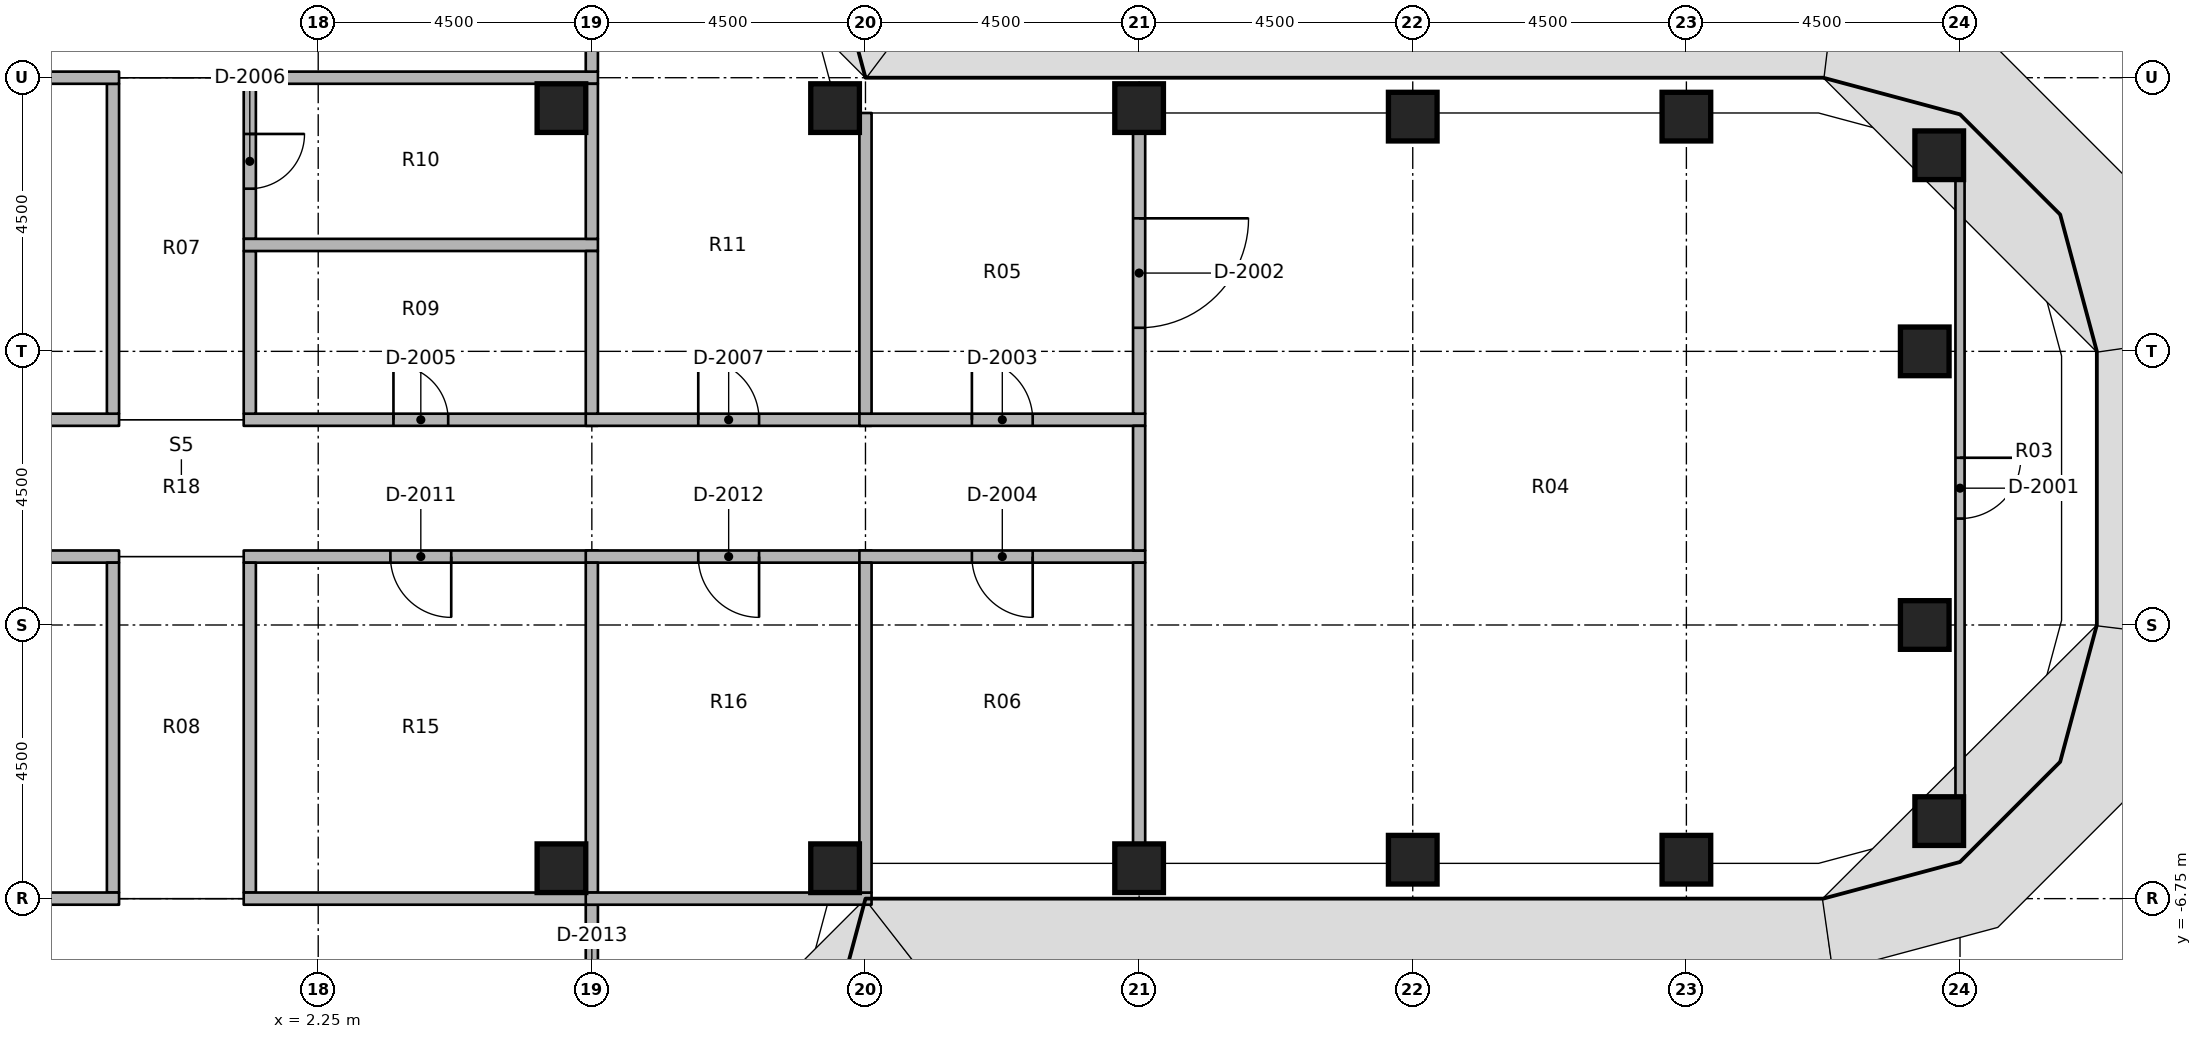
"""IFC4 building model, lengths in metres.
Left out: names, types, materials, properties, quantities, classifications, styles, units other than length and angle.
Written with IfcOpenShell. Run it as: python <this file> out.ifc"""

import sys

from ifc_helpers import new_model, si_unit, direction, frame, frame_2d, origin, origin_2d, place, context, subcontext, project, spatial, rectangle, extrude, element, fill, save


model = new_model("IFC4")
c1 = context("Model", 3, precision=1e-05, world=origin(), true_north=direction((0.0, 1.0)))
c2 = subcontext(c1, "Body", "Model", "MODEL_VIEW")
j1 = project(units=[si_unit("LENGTHUNIT", "METRE"), si_unit("PLANEANGLEUNIT", "RADIAN")], contexts=[c1])
p1 = place(None, origin())
s1 = spatial("IfcSite", under=j1, at=p1, CompositionType="ELEMENT")
p2 = place(p1, origin())
s2 = spatial("IfcBuilding", under=s1, at=p2, CompositionType="ELEMENT")
p3 = place(p2, frame((0.0, 0.0, 186.6)))
s3 = spatial("IfcBuildingStorey", under=s2, at=p3, CompositionType="ELEMENT", Elevation=186.6)
for number, where, z_axis, x_axis in (
    (1, (6.25, -6.25, 0.0), (0.0, 0.0, 1.0), (1.0, 0.0, 0.0)),
    (2, (6.25, 6.25, 0.0), (0.0, 0.0, 1.0), (1.0, 0.0, 0.0)),
    (3, (10.75, -6.25, 0.0), (0.0, 0.0, 1.0), (1.0, 0.0, 0.0)),
    (4, (10.75, 6.25, 0.0), (0.0, 0.0, 1.0), (1.0, 0.0, 0.0)),
    (5, (15.75, -6.25, 0.0), (0.0, 0.0, 1.0), (1.0, 0.0, 0.0)),
    (6, (15.75, 6.25, 0.0), (0.0, 0.0, 1.0), (1.0, 0.0, 0.0)),
    (7, (20.25, -6.11, 0.0), (0.0, 0.0, 1.0), (1.0, 0.0, 0.0)),
    (8, (20.25, 6.11, 0.0), (0.0, 0.0, 1.0), (1.0, 0.0, 0.0)),
    (9, (24.75, -6.11, 0.0), (0.0, 0.0, 1.0), (1.0, 0.0, 0.0)),
    (10, (24.75, 6.11, 0.0), (0.0, 0.0, 1.0), (1.0, 0.0, 0.0)),
    (11, (28.908, -5.475, 0.0), (0.0, 0.0, 1.0), (1.0, 0.0, 0.0)),
    (12, (28.67, -2.25, 0.0), (0.0, 0.0, 1.0), (1.0, 0.0, 0.0)),
    (13, (28.67, 2.25, 0.0), (0.0, 0.0, 1.0), (1.0, 0.0, 0.0)),
    (14, (28.908, 5.475, 0.0), (0.0, 0.0, 1.0), (1.0, 0.0, 0.0)),
):
    element("IfcColumn", number, at=place(p3, frame(where, z_axis=z_axis, x_axis=x_axis)), inside=s3, PredefinedType="COLUMN", context=c2, shape_type="SweptSolid", body=[
        extrude(rectangle(XDim=0.8, YDim=0.8, at=origin_2d()), origin(), (0.0, 0.0, 1.0), 3.65),
    ])
p4 = place(p3, frame((1.025, 1.125, 0.0), z_axis=(0.0, 0.0, 1.0), x_axis=(1.0, 0.0, 0.0)))
e15 = element("IfcWall", 15, at=p4, inside=s3, PredefinedType="PARTITIONING", context=c2, shape_type="SweptSolid", body=[
    extrude(rectangle(XDim=5.825, YDim=0.2, at=frame_2d((2.913, 0.0))), origin(), (0.0, 0.0, 1.0), 2.746),
])
p5 = place(p4, frame((2.462, 0.0, 0.0)))
e16 = element("IfcOpeningElement", 16, at=p5, cuts=e15, PredefinedType="OPENING", context=c2, shape_type="SweptSolid", body=[
    extrude(rectangle(XDim=0.9, YDim=2.1, at=frame_2d((0.45, 1.05))), frame((0.0, 0.11, 0.0), z_axis=(0.0, -1.0, 0.0), x_axis=(1.0, 0.0, 0.0)), (0.0, 0.0, 1.0), 0.22),
])
p6 = place(p3, frame((6.65, 1.125, 0.0), z_axis=(0.0, 0.0, 1.0), x_axis=(1.0, 0.0, 0.0)))
e17 = element("IfcWall", 17, at=p6, inside=s3, PredefinedType="PARTITIONING", context=c2, shape_type="SweptSolid", body=[
    extrude(rectangle(XDim=4.7, YDim=0.2, at=frame_2d((2.35, 0.0))), origin(), (0.0, 0.0, 1.0), 2.746),
])
p7 = place(p6, frame((1.85, 0.0, 0.0)))
e18 = element("IfcOpeningElement", 18, at=p7, cuts=e17, PredefinedType="OPENING", context=c2, shape_type="SweptSolid", body=[
    extrude(rectangle(XDim=1.0, YDim=2.1, at=frame_2d((0.5, 1.05))), frame((0.0, 0.11, 0.0), z_axis=(0.0, -1.0, 0.0), x_axis=(1.0, 0.0, 0.0)), (0.0, 0.0, 1.0), 0.22),
])
p8 = place(p3, frame((-6.85, 1.125, 0.0), z_axis=(0.0, 0.0, 1.0), x_axis=(1.0, 0.0, 0.0)))
e19 = element("IfcWall", 19, at=p8, inside=s3, PredefinedType="PARTITIONING", context=c2, shape_type="SweptSolid", body=[
    extrude(rectangle(XDim=5.825, YDim=0.2, at=frame_2d((2.913, 0.0))), origin(), (0.0, 0.0, 1.0), 2.746),
])
p9 = place(p8, frame((2.413, 0.0, 0.0)))
e20 = element("IfcOpeningElement", 20, at=p9, cuts=e19, PredefinedType="OPENING", context=c2, shape_type="SweptSolid", body=[
    extrude(rectangle(XDim=1.0, YDim=2.1, at=frame_2d((0.5, 1.05))), frame((0.0, 0.11, 0.0), z_axis=(0.0, -1.0, 0.0), x_axis=(1.0, 0.0, 0.0)), (0.0, 0.0, 1.0), 0.22),
])
p10 = place(p3, frame((6.85, -1.125, 0.0), z_axis=(0.0, 0.0, 1.0), x_axis=(-1.0, 0.0, 0.0)))
e21 = element("IfcWall", 21, at=p10, inside=s3, PredefinedType="PARTITIONING", context=c2, shape_type="SweptSolid", body=[
    extrude(rectangle(XDim=5.825, YDim=0.2, at=frame_2d((2.913, 0.0))), origin(), (0.0, 0.0, 1.0), 2.746),
])
p11 = place(p10, frame((2.413, 0.0, 0.0)))
e22 = element("IfcOpeningElement", 22, at=p11, cuts=e21, PredefinedType="OPENING", context=c2, shape_type="SweptSolid", body=[
    extrude(rectangle(XDim=1.0, YDim=2.1, at=frame_2d((0.5, 1.05))), frame((0.0, 0.11, 0.0), z_axis=(0.0, -1.0, 0.0), x_axis=(1.0, 0.0, 0.0)), (0.0, 0.0, 1.0), 0.22),
])
p12 = place(p3, frame((11.35, -1.125, 0.0), z_axis=(0.0, 0.0, 1.0), x_axis=(-1.0, 0.0, 0.0)))
e23 = element("IfcWall", 23, at=p12, inside=s3, PredefinedType="PARTITIONING", context=c2, shape_type="SweptSolid", body=[
    extrude(rectangle(XDim=4.7, YDim=0.2, at=frame_2d((2.35, 0.0))), origin(), (0.0, 0.0, 1.0), 2.746),
])
p13 = place(p12, frame((1.85, 0.0, 0.0)))
e24 = element("IfcOpeningElement", 24, at=p13, cuts=e23, PredefinedType="OPENING", context=c2, shape_type="SweptSolid", body=[
    extrude(rectangle(XDim=1.0, YDim=2.1, at=frame_2d((0.5, 1.05))), frame((0.0, 0.11, 0.0), z_axis=(0.0, -1.0, 0.0), x_axis=(1.0, 0.0, 0.0)), (0.0, 0.0, 1.0), 0.22),
])
p14 = place(p3, frame((-1.025, -1.125, 0.0), z_axis=(0.0, 0.0, 1.0), x_axis=(-1.0, 0.0, 0.0)))
e25 = element("IfcWall", 25, at=p14, inside=s3, PredefinedType="PARTITIONING", context=c2, shape_type="SweptSolid", body=[
    extrude(rectangle(XDim=5.825, YDim=0.2, at=frame_2d((2.913, 0.0))), origin(), (0.0, 0.0, 1.0), 2.746),
])
p15 = place(p14, frame((2.413, 0.0, 0.0)))
e26 = element("IfcOpeningElement", 26, at=p15, cuts=e25, PredefinedType="OPENING", context=c2, shape_type="SweptSolid", body=[
    extrude(rectangle(XDim=1.0, YDim=2.1, at=frame_2d((0.5, 1.05))), frame((0.0, 0.11, 0.0), z_axis=(0.0, -1.0, 0.0), x_axis=(1.0, 0.0, 0.0)), (0.0, 0.0, 1.0), 0.22),
])
p16 = place(p3, frame((11.15, 1.125, 0.0), z_axis=(0.0, 0.0, 1.0), x_axis=(1.0, 0.0, 0.0)))
e27 = element("IfcWall", 27, at=p16, inside=s3, PredefinedType="PARTITIONING", context=c2, shape_type="SweptSolid", body=[
    extrude(rectangle(XDim=4.7, YDim=0.2, at=frame_2d((2.35, 0.0))), origin(), (0.0, 0.0, 1.0), 2.746),
])
p17 = place(p16, frame((1.85, 0.0, 0.0)))
e28 = element("IfcOpeningElement", 28, at=p17, cuts=e27, PredefinedType="OPENING", context=c2, shape_type="SweptSolid", body=[
    extrude(rectangle(XDim=1.0, YDim=2.1, at=frame_2d((0.5, 1.05))), frame((0.0, 0.11, 0.0), z_axis=(0.0, -1.0, 0.0), x_axis=(1.0, 0.0, 0.0)), (0.0, 0.0, 1.0), 0.22),
])
p18 = place(p3, frame((15.85, -1.125, 0.0), z_axis=(0.0, 0.0, 1.0), x_axis=(-1.0, 0.0, 0.0)))
e29 = element("IfcWall", 29, at=p18, inside=s3, PredefinedType="PARTITIONING", context=c2, shape_type="SweptSolid", body=[
    extrude(rectangle(XDim=4.7, YDim=0.2, at=frame_2d((2.35, 0.0))), origin(), (0.0, 0.0, 1.0), 2.746),
])
p19 = place(p18, frame((1.85, 0.0, 0.0)))
e30 = element("IfcOpeningElement", 30, at=p19, cuts=e29, PredefinedType="OPENING", context=c2, shape_type="SweptSolid", body=[
    extrude(rectangle(XDim=1.0, YDim=2.1, at=frame_2d((0.5, 1.05))), frame((0.0, 0.11, 0.0), z_axis=(0.0, -1.0, 0.0), x_axis=(1.0, 0.0, 0.0)), (0.0, 0.0, 1.0), 0.22),
])
p20 = place(p3, frame((15.75, -1.025, 0.0), z_axis=(0.0, 0.0, 1.0), x_axis=(0.0, 1.0, 0.0)))
e31 = element("IfcWall", 31, at=p20, inside=s3, PredefinedType="PARTITIONING", context=c2, shape_type="SweptSolid", body=[
    extrude(rectangle(XDim=2.05, YDim=0.2, at=frame_2d((1.025, 0.0))), origin(), (0.0, 0.0, 1.0), 2.746),
])
p21 = place(p3, frame((1.125, 1.225, 0.0), z_axis=(0.0, 0.0, 1.0), x_axis=(0.0, 1.0, 0.0)))
e32 = element("IfcWall", 32, at=p21, inside=s3, PredefinedType="PARTITIONING", context=c2, shape_type="SweptSolid", body=[
    extrude(rectangle(XDim=2.675, YDim=0.2, at=frame_2d((1.337, 0.0))), origin(), (0.0, 0.0, 1.0), 2.746),
])
p22 = place(p3, frame((1.125, 6.65, 0.0), z_axis=(0.0, 0.0, 1.0), x_axis=(0.0, -1.0, 0.0)))
e33 = element("IfcWall", 33, at=p22, inside=s3, PredefinedType="PARTITIONING", context=c2, shape_type="SweptSolid", body=[
    extrude(rectangle(XDim=2.55, YDim=0.2, at=frame_2d((1.275, 0.0))), origin(), (0.0, 0.0, 1.0), 2.746),
])
p23 = place(p22, frame((0.825, 0.0, 0.0)))
e34 = element("IfcOpeningElement", 34, at=p23, cuts=e33, PredefinedType="OPENING", context=c2, shape_type="SweptSolid", body=[
    extrude(rectangle(XDim=0.9, YDim=2.1, at=frame_2d((0.45, 1.05))), frame((0.0, 0.11, 0.0), z_axis=(0.0, -1.0, 0.0), x_axis=(1.0, 0.0, 0.0)), (0.0, 0.0, 1.0), 0.22),
])
for number, where, z_axis, x_axis in (
    (35, (-1.125, 1.225, 0.0), (0.0, 0.0, 1.0), (0.0, 1.0, 0.0)),
    (36, (1.125, -6.65, 0.0), (0.0, 0.0, 1.0), (0.0, 1.0, 0.0)),
    (37, (-1.125, -6.65, 0.0), (0.0, 0.0, 1.0), (0.0, 1.0, 0.0)),
):
    element("IfcWall", number, at=place(p3, frame(where, z_axis=z_axis, x_axis=x_axis)), inside=s3, PredefinedType="PARTITIONING", context=c2, shape_type="SweptSolid", body=[
        extrude(rectangle(XDim=5.425, YDim=0.2, at=frame_2d((2.712, 0.0))), origin(), (0.0, 0.0, 1.0), 2.746),
    ])
p24 = place(p3, frame((1.025, 6.75, 0.0), z_axis=(0.0, 0.0, 1.0), x_axis=(1.0, 0.0, 0.0)))
e38 = element("IfcWall", 38, at=p24, inside=s3, PredefinedType="PARTITIONING", context=c2, shape_type="SweptSolid", body=[
    extrude(rectangle(XDim=5.825, YDim=0.2, at=frame_2d((2.913, 0.0))), origin(), (0.0, 0.0, 1.0), 2.746),
])
p25 = place(p3, frame((6.75, 6.85, 0.0), z_axis=(0.0, 0.0, 1.0), x_axis=(0.0, 1.0, 0.0)))
e39 = element("IfcWall", 39, at=p25, inside=s3, PredefinedType="PARTITIONING", context=c2, shape_type="SweptSolid", body=[
    extrude(rectangle(XDim=3.78, YDim=0.2, at=frame_2d((1.89, 0.0))), origin(), (0.0, 0.0, 1.0), 2.746),
])
for number, where, z_axis, x_axis in (
    (40, (-6.85, 6.75, 0.0), (0.0, 0.0, 1.0), (1.0, 0.0, 0.0)),
    (41, (1.025, -6.75, 0.0), (0.0, 0.0, 1.0), (1.0, 0.0, 0.0)),
):
    element("IfcWall", number, at=place(p3, frame(where, z_axis=z_axis, x_axis=x_axis)), inside=s3, PredefinedType="PARTITIONING", context=c2, shape_type="SweptSolid", body=[
        extrude(rectangle(XDim=5.825, YDim=0.2, at=frame_2d((2.913, 0.0))), origin(), (0.0, 0.0, 1.0), 2.746),
    ])
p26 = place(p3, frame((6.75, -6.85, 0.0), z_axis=(0.0, 0.0, 1.0), x_axis=(0.0, -1.0, 0.0)))
e42 = element("IfcWall", 42, at=p26, inside=s3, PredefinedType="PARTITIONING", context=c2, shape_type="SweptSolid", body=[
    extrude(rectangle(XDim=3.78, YDim=0.2, at=frame_2d((1.89, 0.0))), origin(), (0.0, 0.0, 1.0), 2.746),
])
p27 = place(p26, frame((1.44, 0.0, 0.0)))
e43 = element("IfcOpeningElement", 43, at=p27, cuts=e42, PredefinedType="OPENING", context=c2, shape_type="SweptSolid", body=[
    extrude(rectangle(XDim=0.9, YDim=2.1, at=frame_2d((0.45, 1.05))), frame((0.0, 0.11, 0.0), z_axis=(0.0, -1.0, 0.0), x_axis=(1.0, 0.0, 0.0)), (0.0, 0.0, 1.0), 0.22),
])
for number, where, z_axis, x_axis in (
    (44, (-6.85, -6.75, 0.0), (0.0, 0.0, 1.0), (1.0, 0.0, 0.0)),
    (45, (1.025, 4.0, 0.0), (0.0, 0.0, 1.0), (1.0, 0.0, 0.0)),
):
    element("IfcWall", number, at=place(p3, frame(where, z_axis=z_axis, x_axis=x_axis)), inside=s3, PredefinedType="PARTITIONING", context=c2, shape_type="SweptSolid", body=[
        extrude(rectangle(XDim=5.825, YDim=0.2, at=frame_2d((2.913, 0.0))), origin(), (0.0, 0.0, 1.0), 2.746),
    ])
p28 = place(p3, frame((6.75, 1.225, 0.0), z_axis=(0.0, 0.0, 1.0), x_axis=(0.0, 1.0, 0.0)))
e46 = element("IfcWall", 46, at=p28, inside=s3, PredefinedType="PARTITIONING", context=c2, shape_type="SweptSolid", body=[
    extrude(rectangle(XDim=2.675, YDim=0.2, at=frame_2d((1.337, 0.0))), origin(), (0.0, 0.0, 1.0), 2.746),
])
p29 = place(p3, frame((6.75, 4.1, 0.0), z_axis=(0.0, 0.0, 1.0), x_axis=(0.0, 1.0, 0.0)))
e47 = element("IfcWall", 47, at=p29, inside=s3, PredefinedType="PARTITIONING", context=c2, shape_type="SweptSolid", body=[
    extrude(rectangle(XDim=2.55, YDim=0.2, at=frame_2d((1.275, 0.0))), origin(), (0.0, 0.0, 1.0), 2.746),
])
p30 = place(p3, frame((11.25, 1.225, 0.0), z_axis=(0.0, 0.0, 1.0), x_axis=(0.0, 1.0, 0.0)))
e48 = element("IfcWall", 48, at=p30, inside=s3, PredefinedType="PARTITIONING", context=c2, shape_type="SweptSolid", body=[
    extrude(rectangle(XDim=4.945, YDim=0.2, at=frame_2d((2.472, 0.0))), origin(), (0.0, 0.0, 1.0), 2.746),
])
p31 = place(p3, frame((6.75, -6.65, 0.0), z_axis=(0.0, 0.0, 1.0), x_axis=(0.0, 1.0, 0.0)))
e49 = element("IfcWall", 49, at=p31, inside=s3, PredefinedType="PARTITIONING", context=c2, shape_type="SweptSolid", body=[
    extrude(rectangle(XDim=5.425, YDim=0.2, at=frame_2d((2.712, 0.0))), origin(), (0.0, 0.0, 1.0), 2.746),
])
p32 = place(p3, frame((6.65, -6.75, 0.0), z_axis=(0.0, 0.0, 1.0), x_axis=(1.0, 0.0, 0.0)))
e50 = element("IfcWall", 50, at=p32, inside=s3, PredefinedType="PARTITIONING", context=c2, shape_type="SweptSolid", body=[
    extrude(rectangle(XDim=4.7, YDim=0.2, at=frame_2d((2.35, 0.0))), origin(), (0.0, 0.0, 1.0), 2.746),
])
p33 = place(p3, frame((11.25, -6.65, 0.0), z_axis=(0.0, 0.0, 1.0), x_axis=(0.0, 1.0, 0.0)))
e51 = element("IfcWall", 51, at=p33, inside=s3, PredefinedType="PARTITIONING", context=c2, shape_type="SweptSolid", body=[
    extrude(rectangle(XDim=5.425, YDim=0.2, at=frame_2d((2.712, 0.0))), origin(), (0.0, 0.0, 1.0), 2.746),
])
p34 = place(p3, frame((15.75, 5.85, 0.0), z_axis=(0.0, 0.0, 1.0), x_axis=(0.0, -1.0, 0.0)))
e52 = element("IfcWall", 52, at=p34, inside=s3, PredefinedType="PARTITIONING", context=c2, shape_type="SweptSolid", body=[
    extrude(rectangle(XDim=4.625, YDim=0.2, at=frame_2d((2.312, 0.0))), origin(), (0.0, 0.0, 1.0), 2.746),
])
p35 = place(p34, frame((1.413, 0.0, 0.0)))
e53 = element("IfcOpeningElement", 53, at=p35, cuts=e52, PredefinedType="OPENING", context=c2, shape_type="SweptSolid", body=[
    extrude(rectangle(XDim=1.8, YDim=2.1, at=frame_2d((0.9, 1.05))), frame((0.0, 0.11, 0.0), z_axis=(0.0, -1.0, 0.0), x_axis=(1.0, 0.0, 0.0)), (0.0, 0.0, 1.0), 0.22),
])
p36 = place(p3, frame((15.75, -5.85, 0.0), z_axis=(0.0, 0.0, 1.0), x_axis=(0.0, 1.0, 0.0)))
e54 = element("IfcWall", 54, at=p36, inside=s3, PredefinedType="PARTITIONING", context=c2, shape_type="SweptSolid", body=[
    extrude(rectangle(XDim=4.625, YDim=0.2, at=frame_2d((2.312, 0.0))), origin(), (0.0, 0.0, 1.0), 2.746),
])
p37 = place(p3, frame((29.25, 5.075, 0.0), z_axis=(0.0, 0.0, 1.0), x_axis=(0.0, -1.0, 0.0)))
e55 = element("IfcWall", 55, at=p37, inside=s3, PredefinedType="PARTITIONING", context=c2, shape_type="SweptSolid", body=[
    extrude(rectangle(XDim=10.15, YDim=0.15, at=frame_2d((5.075, 0.0))), origin(), (0.0, 0.0, 1.0), 2.746),
])
p38 = place(p37, frame((4.575, 0.0, 0.0)))
e56 = element("IfcOpeningElement", 56, at=p38, cuts=e55, PredefinedType="OPENING", context=c2, shape_type="SweptSolid", body=[
    extrude(rectangle(XDim=1.0, YDim=2.1, at=frame_2d((0.5, 1.05))), frame((0.0, 0.085, 0.0), z_axis=(0.0, -1.0, 0.0), x_axis=(1.0, 0.0, 0.0)), (0.0, 0.0, 1.0), 0.17),
])
p39 = place(p38, origin())
e57 = element("IfcDoor", 57, at=p39, inside=s3, OperationType="SINGLE_SWING_RIGHT", PredefinedType="DOOR", context=c2, shape_type="SweptSolid", body=[
    extrude(rectangle(XDim=1.0, YDim=2.1, at=frame_2d((0.5, 1.05))), frame((0.0, 0.025, 0.0), z_axis=(0.0, -1.0, 0.0), x_axis=(1.0, 0.0, 0.0)), (0.0, 0.0, 1.0), 0.05),
])
fill(e56, e57)
p40 = place(p35, origin())
e58 = element("IfcDoor", 58, at=p40, inside=s3, OperationType="DOUBLE_DOOR_SINGLE_SWING", PredefinedType="DOOR", context=c2, shape_type="SweptSolid", body=[
    extrude(rectangle(XDim=1.8, YDim=2.1, at=frame_2d((0.9, 1.05))), frame((0.0, 0.025, 0.0), z_axis=(0.0, -1.0, 0.0), x_axis=(1.0, 0.0, 0.0)), (0.0, 0.0, 1.0), 0.05),
])
fill(e53, e58)
p41 = place(p17, origin())
e59 = element("IfcDoor", 59, at=p41, inside=s3, OperationType="SINGLE_SWING_RIGHT", PredefinedType="DOOR", context=c2, shape_type="SweptSolid", body=[
    extrude(rectangle(XDim=1.0, YDim=2.1, at=frame_2d((0.5, 1.05))), frame((0.0, 0.025, 0.0), z_axis=(0.0, -1.0, 0.0), x_axis=(1.0, 0.0, 0.0)), (0.0, 0.0, 1.0), 0.05),
])
fill(e28, e59)
p42 = place(p19, origin())
e60 = element("IfcDoor", 60, at=p42, inside=s3, OperationType="SINGLE_SWING_RIGHT", PredefinedType="DOOR", context=c2, shape_type="SweptSolid", body=[
    extrude(rectangle(XDim=1.0, YDim=2.1, at=frame_2d((0.5, 1.05))), frame((0.0, 0.025, 0.0), z_axis=(0.0, -1.0, 0.0), x_axis=(1.0, 0.0, 0.0)), (0.0, 0.0, 1.0), 0.05),
])
fill(e30, e60)
p43 = place(p5, origin())
e61 = element("IfcDoor", 61, at=p43, inside=s3, OperationType="SINGLE_SWING_RIGHT", PredefinedType="DOOR", context=c2, shape_type="SweptSolid", body=[
    extrude(rectangle(XDim=0.9, YDim=2.1, at=frame_2d((0.45, 1.05))), frame((0.0, 0.025, 0.0), z_axis=(0.0, -1.0, 0.0), x_axis=(1.0, 0.0, 0.0)), (0.0, 0.0, 1.0), 0.05),
])
fill(e16, e61)
p44 = place(p23, origin())
e62 = element("IfcDoor", 62, at=p44, inside=s3, OperationType="SINGLE_SWING_RIGHT", PredefinedType="DOOR", context=c2, shape_type="SweptSolid", body=[
    extrude(rectangle(XDim=0.9, YDim=2.1, at=frame_2d((0.45, 1.05))), frame((0.0, 0.025, 0.0), z_axis=(0.0, -1.0, 0.0), x_axis=(1.0, 0.0, 0.0)), (0.0, 0.0, 1.0), 0.05),
])
fill(e34, e62)
p45 = place(p7, origin())
e63 = element("IfcDoor", 63, at=p45, inside=s3, OperationType="SINGLE_SWING_RIGHT", PredefinedType="DOOR", context=c2, shape_type="SweptSolid", body=[
    extrude(rectangle(XDim=1.0, YDim=2.1, at=frame_2d((0.5, 1.05))), frame((0.0, 0.025, 0.0), z_axis=(0.0, -1.0, 0.0), x_axis=(1.0, 0.0, 0.0)), (0.0, 0.0, 1.0), 0.05),
])
fill(e18, e63)
p46 = place(p11, origin())
e64 = element("IfcDoor", 64, at=p46, inside=s3, OperationType="SINGLE_SWING_RIGHT", PredefinedType="DOOR", context=c2, shape_type="SweptSolid", body=[
    extrude(rectangle(XDim=1.0, YDim=2.1, at=frame_2d((0.5, 1.05))), frame((0.0, 0.025, 0.0), z_axis=(0.0, -1.0, 0.0), x_axis=(1.0, 0.0, 0.0)), (0.0, 0.0, 1.0), 0.05),
])
fill(e22, e64)
p47 = place(p13, origin())
e65 = element("IfcDoor", 65, at=p47, inside=s3, OperationType="SINGLE_SWING_RIGHT", PredefinedType="DOOR", context=c2, shape_type="SweptSolid", body=[
    extrude(rectangle(XDim=1.0, YDim=2.1, at=frame_2d((0.5, 1.05))), frame((0.0, 0.025, 0.0), z_axis=(0.0, -1.0, 0.0), x_axis=(1.0, 0.0, 0.0)), (0.0, 0.0, 1.0), 0.05),
])
fill(e24, e65)
save(model, sys.argv[1])
